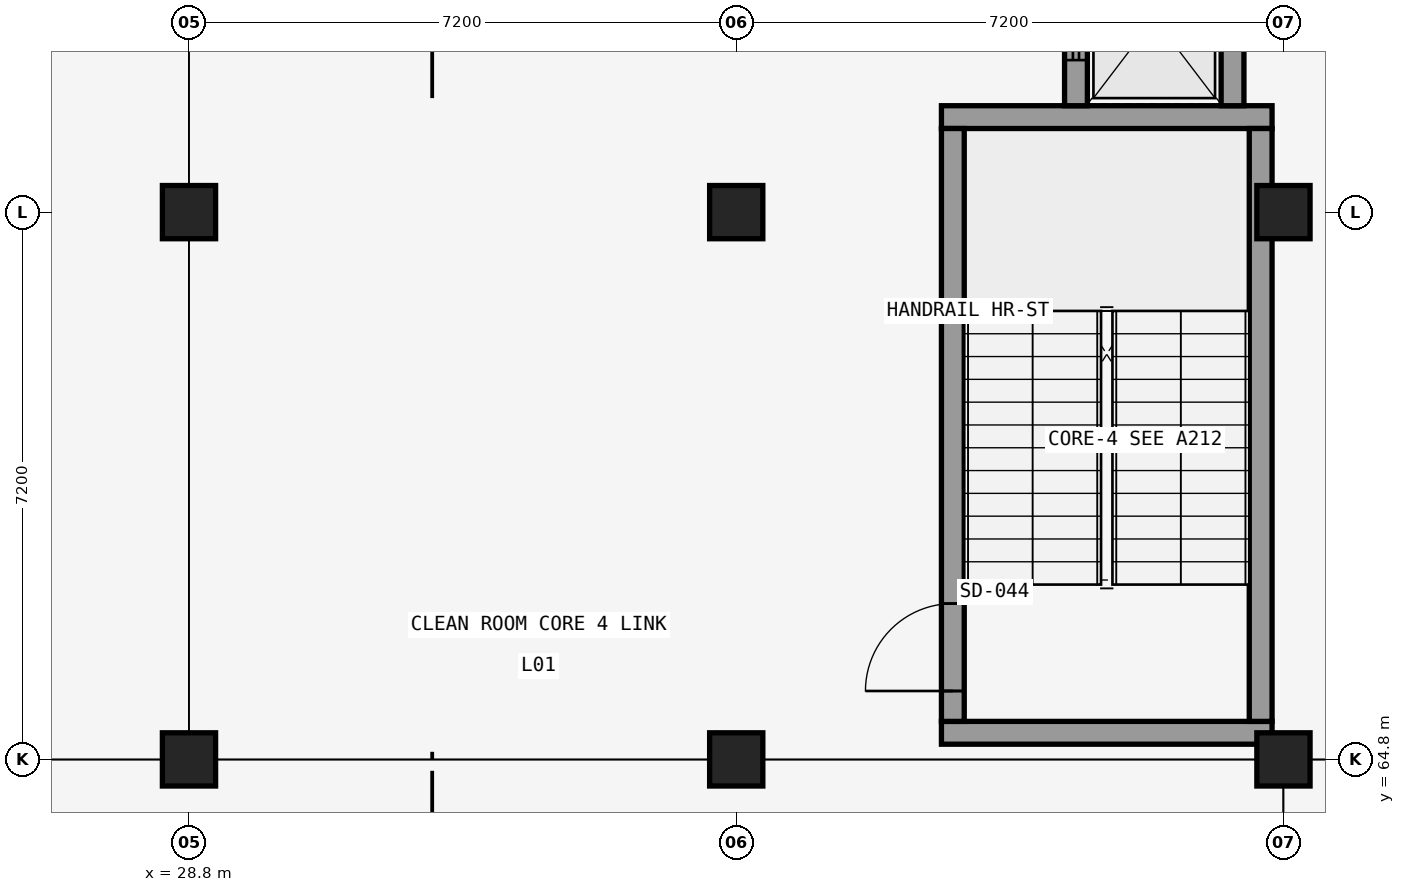
"""IFC4 building model, lengths in metres.
Left out: names, types, materials, properties, quantities, classifications, styles, units other than length and angle.
Written with IfcOpenShell. Run it as: python <this file> out.ifc"""

import sys

from ifc_helpers import new_model, si_unit, direction, frame, frame_2d, origin, origin_2d, place, context, subcontext, project, spatial, rectangle, extrude, element, fill, save


model = new_model("IFC4")
c1 = context("Model", 3, precision=1e-05, world=origin(), true_north=direction((0.0, 1.0)))
c2 = subcontext(c1, "Body", "Model", "MODEL_VIEW")
j1 = project(units=[si_unit("LENGTHUNIT", "METRE"), si_unit("PLANEANGLEUNIT", "RADIAN")], contexts=[c1])
p1 = place(None, origin())
s1 = spatial("IfcSite", under=j1, at=p1, CompositionType="ELEMENT")
p2 = place(p1, origin())
s2 = spatial("IfcBuilding", under=s1, at=p2, CompositionType="ELEMENT")
p3 = place(p2, frame((0.0, 0.0, 4.8)))
s3 = spatial("IfcBuildingStorey", under=s2, at=p3, CompositionType="ELEMENT", Elevation=4.8)
for number, where, z_axis, x_axis in (
    (1, (28.8, 64.8, 0.0), (0.0, 0.0, 1.0), (1.0, 0.0, 0.0)),
    (2, (28.8, 72.0, 0.0), (0.0, 0.0, 1.0), (1.0, 0.0, 0.0)),
    (3, (36.0, 64.8, 0.0), (0.0, 0.0, 1.0), (1.0, 0.0, 0.0)),
    (4, (36.0, 72.0, 0.0), (0.0, 0.0, 1.0), (1.0, 0.0, 0.0)),
    (5, (43.2, 64.8, 0.0), (0.0, 0.0, 1.0), (1.0, 0.0, 0.0)),
    (6, (43.2, 72.0, 0.0), (0.0, 0.0, 1.0), (1.0, 0.0, 0.0)),
):
    element("IfcColumn", number, at=place(p3, frame(where, z_axis=z_axis, x_axis=x_axis)), inside=s3, PredefinedType="COLUMN", context=c2, shape_type="SweptSolid", body=[
        extrude(rectangle(XDim=0.7, YDim=0.7, at=origin_2d()), origin(), (0.0, 0.0, 1.0), 4.16),
    ])
for number, where, z_axis, x_axis in (
    (7, (38.7, 65.15, 0.0), (0.0, 0.0, 1.0), (1.0, 0.0, 0.0)),
    (8, (38.7, 73.25, 0.0), (0.0, 0.0, 1.0), (1.0, 0.0, 0.0)),
):
    element("IfcWall", number, at=place(p3, frame(where, z_axis=z_axis, x_axis=x_axis)), inside=s3, PredefinedType="SHEAR", context=c2, shape_type="SweptSolid", body=[
        extrude(rectangle(XDim=4.35, YDim=0.3, at=frame_2d((2.175, 0.0))), origin(), (0.0, 0.0, 1.0), 3.81),
    ])
p4 = place(p3, frame((38.85, 65.3, 0.0), z_axis=(0.0, 0.0, 1.0), x_axis=(0.0, 1.0, 0.0)))
e9 = element("IfcWall", 9, at=p4, inside=s3, PredefinedType="SHEAR", context=c2, shape_type="SweptSolid", body=[
    extrude(rectangle(XDim=7.8, YDim=0.3, at=frame_2d((3.9, 0.0))), origin(), (0.0, 0.0, 1.0), 3.81),
])
p5 = place(p4, frame((0.4, 0.0, 0.0)))
e10 = element("IfcOpeningElement", 10, at=p5, cuts=e9, PredefinedType="OPENING", context=c2, shape_type="SweptSolid", body=[
    extrude(rectangle(XDim=1.15, YDim=2.2, at=frame_2d((0.575, 1.1))), frame((0.0, 0.16, 0.0), z_axis=(0.0, -1.0, 0.0), x_axis=(1.0, 0.0, 0.0)), (0.0, 0.0, 1.0), 0.32),
])
p6 = place(p3, frame((42.9, 65.3, 0.0), z_axis=(0.0, 0.0, 1.0), x_axis=(0.0, 1.0, 0.0)))
e11 = element("IfcWall", 11, at=p6, inside=s3, PredefinedType="SHEAR", context=c2, shape_type="SweptSolid", body=[
    extrude(rectangle(XDim=7.8, YDim=0.3, at=frame_2d((3.9, 0.0))), origin(), (0.0, 0.0, 1.0), 3.81),
])
p7 = place(p3, frame((40.47, 73.4, 0.0), z_axis=(0.0, 0.0, 1.0), x_axis=(0.0, 1.0, 0.0)))
e12 = element("IfcWall", 12, at=p7, inside=s3, PredefinedType="SHEAR", context=c2, shape_type="SweptSolid", body=[
    extrude(rectangle(XDim=2.28, YDim=0.3, at=frame_2d((1.14, 0.0))), origin(), (0.0, 0.0, 1.0), 3.81),
])
p8 = place(p7, frame((0.6, 0.0, 0.0)))
e13 = element("IfcOpeningElement", 13, at=p8, cuts=e12, PredefinedType="OPENING", context=c2, shape_type="SweptSolid", body=[
    extrude(rectangle(XDim=1.1, YDim=2.2, at=frame_2d((0.55, 1.1))), frame((0.0, 0.16, 0.0), z_axis=(0.0, -1.0, 0.0), x_axis=(1.0, 0.0, 0.0)), (0.0, 0.0, 1.0), 0.32),
])
p9 = place(p3, frame((42.53, 73.4, 0.0), z_axis=(0.0, 0.0, 1.0), x_axis=(0.0, 1.0, 0.0)))
e14 = element("IfcWall", 14, at=p9, inside=s3, PredefinedType="SHEAR", context=c2, shape_type="SweptSolid", body=[
    extrude(rectangle(XDim=2.28, YDim=0.3, at=frame_2d((1.14, 0.0))), origin(), (0.0, 0.0, 1.0), 3.81),
])
p10 = place(p5, frame((1.15, 0.0, 0.0), z_axis=(0.0, 0.0, 1.0), x_axis=(-1.0, 0.0, 0.0)))
e15 = element("IfcDoor", 15, at=p10, inside=s3, OperationType="SINGLE_SWING_LEFT", PredefinedType="DOOR", context=c2, shape_type="SweptSolid", body=[
    extrude(rectangle(XDim=1.15, YDim=2.2, at=frame_2d((0.575, 1.1))), frame((0.0, 0.025, 0.0), z_axis=(0.0, -1.0, 0.0), x_axis=(1.0, 0.0, 0.0)), (0.0, 0.0, 1.0), 0.05),
])
fill(e10, e15)
p11 = place(p8, origin())
e16 = element("IfcDoor", 16, at=p11, inside=s3, OperationType="SLIDING_TO_LEFT", PredefinedType="DOOR", context=c2, shape_type="SweptSolid", body=[
    extrude(rectangle(XDim=1.1, YDim=2.2, at=frame_2d((0.55, 1.1))), frame((0.0, 0.025, 0.0), z_axis=(0.0, -1.0, 0.0), x_axis=(1.0, 0.0, 0.0)), (0.0, 0.0, 1.0), 0.05),
])
fill(e13, e16)
save(model, sys.argv[1])
